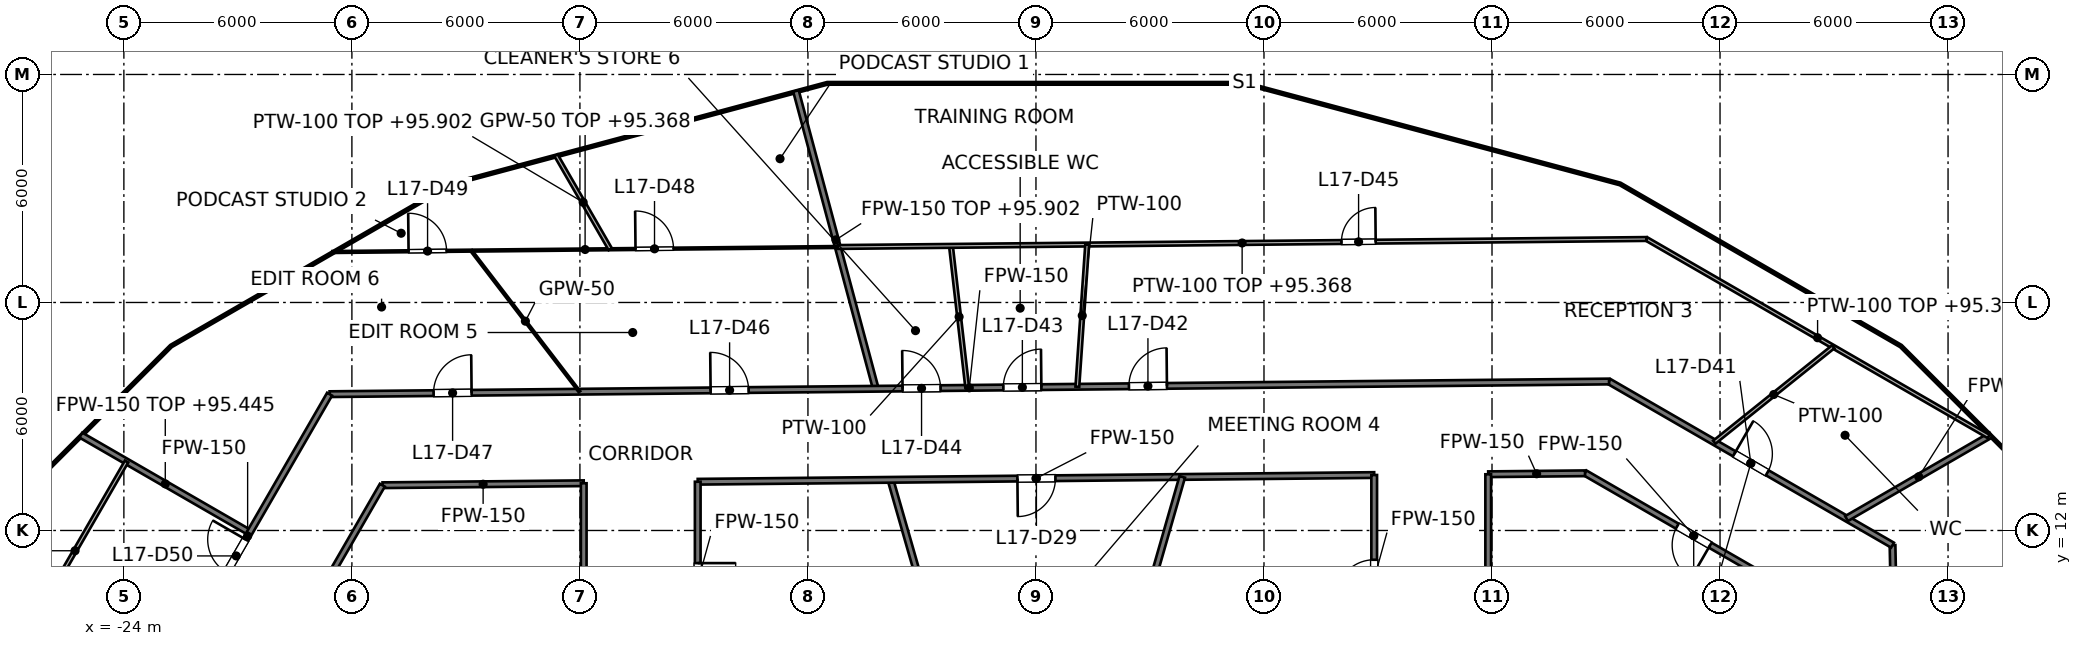
"""IFC4 building model, lengths in metres.
Left out: names, types, materials, properties, quantities, classifications, styles, units other than length and angle.
Written with IfcOpenShell. Run it as: python <this file> out.ifc"""

import sys

from ifc_helpers import new_model, si_unit, direction, frame, frame_2d, origin, place, context, subcontext, project, spatial, rectangle, extrude, element, fill, save


model = new_model("IFC4")
c1 = context("Model", 3, precision=1e-05, world=origin(), true_north=direction((0.0, 1.0)))
c2 = subcontext(c1, "Body", "Model", "MODEL_VIEW")
j1 = project(units=[si_unit("LENGTHUNIT", "METRE"), si_unit("PLANEANGLEUNIT", "RADIAN")], contexts=[c1])
p1 = place(None, origin())
s1 = spatial("IfcSite", under=j1, at=p1, CompositionType="ELEMENT")
p2 = place(p1, origin())
s2 = spatial("IfcBuilding", under=s1, at=p2, CompositionType="ELEMENT")
p3 = place(p2, frame((0.0, 0.0, 92.4)))
s3 = spatial("IfcBuildingStorey", under=s2, at=p3, CompositionType="ELEMENT", Elevation=92.4)
p4 = place(p3, frame((22.539, 11.615, 0.0), z_axis=(0.0, 0.0, 1.0), x_axis=(0.020601506683, -0.99978776644, 0.0)))
e1 = element("IfcWall", 1, at=p4, inside=s3, PredefinedType="PARTITIONING", context=c2, shape_type="SweptSolid", body=[
    extrude(rectangle(XDim=19.66, YDim=0.15, at=frame_2d((9.83, 0.0))), origin(), (0.0, 0.0, 1.0), 2.968),
])
p5 = place(p4, frame((13.54, 0.0, 0.0)))
e2 = element("IfcOpeningElement", 2, at=p5, cuts=e1, PredefinedType="OPENING", context=c2, shape_type="SweptSolid", body=[
    extrude(rectangle(XDim=1.0, YDim=2.1, at=frame_2d((0.5, 1.05))), frame((0.0, 0.075, 0.0), z_axis=(0.0, -1.0, 0.0), x_axis=(1.0, 0.0, 0.0)), (0.0, 0.0, 1.0), 0.15),
])
p6 = place(p4, frame((9.23, 0.0, 0.0)))
e3 = element("IfcOpeningElement", 3, at=p6, cuts=e1, PredefinedType="OPENING", context=c2, shape_type="SweptSolid", body=[
    extrude(rectangle(XDim=1.0, YDim=2.1, at=frame_2d((0.5, 1.05))), frame((0.0, 0.075, 0.0), z_axis=(0.0, -1.0, 0.0), x_axis=(1.0, 0.0, 0.0)), (0.0, 0.0, 1.0), 0.15),
])
p7 = place(p3, frame((-6.315, 23.566, 0.0), z_axis=(0.0, 0.0, 1.0), x_axis=(0.258844392232, -0.96591903419, 0.0)))
e4 = element("IfcWall", 4, at=p7, inside=s3, PredefinedType="PARTITIONING", context=c2, shape_type="SweptSolid", body=[
    extrude(rectangle(XDim=8.112, YDim=0.15, at=frame_2d((4.056, 0.0))), origin(), (0.0, 0.0, 1.0), 3.502),
])
p8 = place(p3, frame((-3.827, 13.333, 0.0), z_axis=(0.0, 0.0, 1.0), x_axis=(0.275935525478, -0.961176147113, 0.0)))
e5 = element("IfcWall", 5, at=p8, inside=s3, PredefinedType="PARTITIONING", context=c2, shape_type="SweptSolid", body=[
    extrude(rectangle(XDim=5.548, YDim=0.15, at=frame_2d((2.774, 0.0))), origin(), (0.0, 0.0, 1.0), 3.9),
])
p9 = place(p3, frame((-25.131, 14.509, 0.0), z_axis=(0.0, 0.0, 1.0), x_axis=(0.866037334331, -0.499979335118, 0.0)))
e6 = element("IfcWall", 6, at=p9, inside=s3, PredefinedType="PARTITIONING", context=c2, shape_type="SweptSolid", body=[
    extrude(rectangle(XDim=5.128, YDim=0.15, at=frame_2d((2.564, 0.0))), origin(), (0.0, 0.0, 1.0), 3.045),
])
p10 = place(p3, frame((14.448, 13.515, 0.0), z_axis=(0.0, 0.0, 1.0), x_axis=(0.866032288321, -0.499988075443, 0.0)))
e7 = element("IfcWall", 7, at=p10, inside=s3, PredefinedType="PARTITIONING", context=c2, shape_type="SweptSolid", body=[
    extrude(rectangle(XDim=6.604, YDim=0.15, at=frame_2d((3.302, 0.0))), origin(), (0.0, 0.0, 1.0), 2.968),
])
p11 = place(p10, frame((2.802, 0.0, 0.0)))
e8 = element("IfcOpeningElement", 8, at=p11, cuts=e7, PredefinedType="OPENING", context=c2, shape_type="SweptSolid", body=[
    extrude(rectangle(XDim=1.0, YDim=2.1, at=frame_2d((0.5, 1.05))), frame((0.0, 0.075, 0.0), z_axis=(0.0, -1.0, 0.0), x_axis=(1.0, 0.0, 0.0)), (0.0, 0.0, 1.0), 0.15),
])
p12 = place(p3, frame((15.08, 15.921, 0.0), z_axis=(0.0, 0.0, 1.0), x_axis=(0.866020838546, -0.500007907142, 0.0)))
e9 = element("IfcWall", 9, at=p12, inside=s3, PredefinedType="PARTITIONING", context=c2, shape_type="SweptSolid", body=[
    extrude(rectangle(XDim=8.613, YDim=0.15, at=frame_2d((4.306, 0.0))), origin(), (0.0, 0.0, 1.0), 2.968),
])
p13 = place(p12, frame((3.807, 0.0, 0.0)))
e10 = element("IfcOpeningElement", 10, at=p13, cuts=e9, PredefinedType="OPENING", context=c2, shape_type="SweptSolid", body=[
    extrude(rectangle(XDim=1.0, YDim=2.1, at=frame_2d((0.5, 1.05))), frame((0.0, 0.075, 0.0), z_axis=(0.0, -1.0, 0.0), x_axis=(1.0, 0.0, 0.0)), (0.0, 0.0, 1.0), 0.15),
])
p14 = place(p3, frame((-17.194, 13.191, 0.0), z_axis=(0.0, 0.0, 1.0), x_axis=(0.999950853109, 0.009914200296, 0.0)))
e11 = element("IfcWall", 11, at=p14, inside=s3, PredefinedType="PARTITIONING", context=c2, shape_type="SweptSolid", body=[
    extrude(rectangle(XDim=5.294, YDim=0.15, at=frame_2d((2.647, 0.0))), origin(), (0.0, 0.0, 1.0), 2.968),
])
p15 = place(p3, frame((-8.9, 13.282, 0.0), z_axis=(0.0, 0.0, 1.0), x_axis=(0.999950834077, 0.009916119672, 0.0)))
e12 = element("IfcWall", 12, at=p15, inside=s3, PredefinedType="PARTITIONING", context=c2, shape_type="SweptSolid", body=[
    extrude(rectangle(XDim=17.801, YDim=0.15, at=frame_2d((8.9, 0.0))), origin(), (0.0, 0.0, 1.0), 2.968),
])
p16 = place(p15, frame((8.412, 0.0, 0.0)))
e13 = element("IfcOpeningElement", 13, at=p16, cuts=e12, PredefinedType="OPENING", context=c2, shape_type="SweptSolid", body=[
    extrude(rectangle(XDim=1.0, YDim=2.1, at=frame_2d((0.5, 1.05))), frame((0.0, 0.075, 0.0), z_axis=(0.0, -1.0, 0.0), x_axis=(1.0, 0.0, 0.0)), (0.0, 0.0, 1.0), 0.15),
])
p17 = place(p3, frame((11.9, 13.48, 0.0), z_axis=(0.0, 0.0, 1.0), x_axis=(0.999950357576, 0.009964054536, 0.0)))
e14 = element("IfcWall", 14, at=p17, inside=s3, PredefinedType="PARTITIONING", context=c2, shape_type="SweptSolid", body=[
    extrude(rectangle(XDim=2.548, YDim=0.15, at=frame_2d((1.274, 0.0))), origin(), (0.0, 0.0, 1.0), 2.968),
])
p18 = place(p3, frame((-18.587, 15.587, 0.0), z_axis=(0.0, 0.0, 1.0), x_axis=(0.99995087003, 0.009912493396, 0.0)))
e15 = element("IfcWall", 15, at=p18, inside=s3, PredefinedType="PARTITIONING", context=c2, shape_type="SweptSolid", body=[
    extrude(rectangle(XDim=33.669, YDim=0.15, at=frame_2d((16.834, 0.0))), origin(), (0.0, 0.0, 1.0), 2.968),
])
p19 = place(p18, frame((21.034, 0.0, 0.0)))
e16 = element("IfcOpeningElement", 16, at=p19, cuts=e15, PredefinedType="OPENING", context=c2, shape_type="SweptSolid", body=[
    extrude(rectangle(XDim=1.0, YDim=2.1, at=frame_2d((0.5, 1.05))), frame((0.0, 0.075, 0.0), z_axis=(0.0, -1.0, 0.0), x_axis=(1.0, 0.0, 0.0)), (0.0, 0.0, 1.0), 0.15),
])
p20 = place(p18, frame((17.73, 0.0, 0.0)))
e17 = element("IfcOpeningElement", 17, at=p20, cuts=e15, PredefinedType="OPENING", context=c2, shape_type="SweptSolid", body=[
    extrude(rectangle(XDim=1.0, YDim=2.1, at=frame_2d((0.5, 1.05))), frame((0.0, 0.075, 0.0), z_axis=(0.0, -1.0, 0.0), x_axis=(1.0, 0.0, 0.0)), (0.0, 0.0, 1.0), 0.15),
])
p21 = place(p18, frame((15.077, 0.0, 0.0)))
e18 = element("IfcOpeningElement", 18, at=p21, cuts=e15, PredefinedType="OPENING", context=c2, shape_type="SweptSolid", body=[
    extrude(rectangle(XDim=1.0, YDim=2.1, at=frame_2d((0.5, 1.05))), frame((0.0, 0.075, 0.0), z_axis=(0.0, -1.0, 0.0), x_axis=(1.0, 0.0, 0.0)), (0.0, 0.0, 1.0), 0.15),
])
p22 = place(p18, frame((10.026, 0.0, 0.0)))
e19 = element("IfcOpeningElement", 19, at=p22, cuts=e15, PredefinedType="OPENING", context=c2, shape_type="SweptSolid", body=[
    extrude(rectangle(XDim=1.0, YDim=2.1, at=frame_2d((0.5, 1.05))), frame((0.0, 0.075, 0.0), z_axis=(0.0, -1.0, 0.0), x_axis=(1.0, 0.0, 0.0)), (0.0, 0.0, 1.0), 0.15),
])
p23 = place(p18, frame((2.737, 0.0, 0.0)))
e20 = element("IfcOpeningElement", 20, at=p23, cuts=e15, PredefinedType="OPENING", context=c2, shape_type="SweptSolid", body=[
    extrude(rectangle(XDim=1.0, YDim=2.1, at=frame_2d((0.5, 1.05))), frame((0.0, 0.075, 0.0), z_axis=(0.0, -1.0, 0.0), x_axis=(1.0, 0.0, 0.0)), (0.0, 0.0, 1.0), 0.15),
])
p24 = place(p3, frame((21.329, 12.314, 0.0), z_axis=(0.0, 0.0, 1.0), x_axis=(0.865416132284, 0.501053807472, 0.0)))
e21 = element("IfcWall", 21, at=p24, inside=s3, PredefinedType="PARTITIONING", context=c2, shape_type="SweptSolid", body=[
    extrude(rectangle(XDim=4.39, YDim=0.15, at=frame_2d((2.195, 0.0))), origin(), (0.0, 0.0, 1.0), 3.045),
])
p25 = place(p3, frame((-20.5, 7.474, 0.0), z_axis=(0.0, 0.0, 1.0), x_axis=(0.500012665616, 0.866018091164, 0.0)))
e22 = element("IfcWall", 22, at=p25, inside=s3, PredefinedType="PARTITIONING", context=c2, shape_type="SweptSolid", body=[
    extrude(rectangle(XDim=6.602, YDim=0.15, at=frame_2d((3.301, 0.0))), origin(), (0.0, 0.0, 1.0), 2.968),
])
p26 = place(p25, frame((2.803, 0.0, 0.0)))
e23 = element("IfcOpeningElement", 23, at=p26, cuts=e22, PredefinedType="OPENING", context=c2, shape_type="SweptSolid", body=[
    extrude(rectangle(XDim=1.0, YDim=2.1, at=frame_2d((0.5, 1.05))), frame((0.0, 0.075, 0.0), z_axis=(0.0, -1.0, 0.0), x_axis=(1.0, 0.0, 0.0)), (0.0, 0.0, 1.0), 0.15),
])
p27 = place(p3, frame((-22.9, 8.117, 0.0), z_axis=(0.0, 0.0, 1.0), x_axis=(0.5000050195, 0.866022505755, 0.0)))
e24 = element("IfcWall", 24, at=p27, inside=s3, PredefinedType="PARTITIONING", context=c2, shape_type="SweptSolid", body=[
    extrude(rectangle(XDim=8.626, YDim=0.15, at=frame_2d((4.313, 0.0))), origin(), (0.0, 0.0, 1.0), 2.968),
])
p28 = place(p27, frame((3.211, 0.0, 0.0)))
e25 = element("IfcOpeningElement", 25, at=p28, cuts=e24, PredefinedType="OPENING", context=c2, shape_type="SweptSolid", body=[
    extrude(rectangle(XDim=1.0, YDim=2.1, at=frame_2d((0.5, 1.05))), frame((0.0, 0.075, 0.0), z_axis=(0.0, -1.0, 0.0), x_axis=(1.0, 0.0, 0.0)), (0.0, 0.0, 1.0), 0.15),
])
p29 = place(p3, frame((2.296, 8.0, 0.0), z_axis=(0.0, 0.0, 1.0), x_axis=(0.275958345059, 0.961169595749, 0.0)))
e26 = element("IfcWall", 26, at=p29, inside=s3, PredefinedType="PARTITIONING", context=c2, shape_type="SweptSolid", body=[
    extrude(rectangle(XDim=5.628, YDim=0.15, at=frame_2d((2.814, 0.0))), origin(), (0.0, 0.0, 1.0), 3.9),
])
p30 = place(p3, frame((11.9, 8.0, 0.0), z_axis=(0.0, 0.0, 1.0), x_axis=(0.0, 1.0, 0.0)))
e27 = element("IfcWall", 27, at=p30, inside=s3, PredefinedType="PARTITIONING", context=c2, shape_type="SweptSolid", body=[
    extrude(rectangle(XDim=5.479, YDim=0.15, at=frame_2d((2.74, 0.0))), origin(), (0.0, 0.0, 1.0), 2.968),
])
p31 = place(p3, frame((8.9, 8.0, 0.0), z_axis=(0.0, 0.0, 1.0), x_axis=(0.0, 1.0, 0.0)))
e28 = element("IfcWall", 28, at=p31, inside=s3, PredefinedType="PARTITIONING", context=c2, shape_type="SweptSolid", body=[
    extrude(rectangle(XDim=5.46, YDim=0.15, at=frame_2d((2.73, 0.0))), origin(), (0.0, 0.0, 1.0), 2.968),
])
p32 = place(p31, frame((2.23, 0.0, 0.0)))
e29 = element("IfcOpeningElement", 29, at=p32, cuts=e28, PredefinedType="OPENING", context=c2, shape_type="SweptSolid", body=[
    extrude(rectangle(XDim=1.0, YDim=2.1, at=frame_2d((0.5, 1.05))), frame((0.0, 0.075, 0.0), z_axis=(0.0, -1.0, 0.0), x_axis=(1.0, 0.0, 0.0)), (0.0, 0.0, 1.0), 0.15),
])
p33 = place(p3, frame((-8.9, 8.0, 0.0), z_axis=(0.0, 0.0, 1.0), x_axis=(0.0, 1.0, 0.0)))
e30 = element("IfcWall", 30, at=p33, inside=s3, PredefinedType="PARTITIONING", context=c2, shape_type="SweptSolid", body=[
    extrude(rectangle(XDim=5.283, YDim=0.15, at=frame_2d((2.642, 0.0))), origin(), (0.0, 0.0, 1.0), 2.968),
])
p34 = place(p33, frame((2.142, 0.0, 0.0)))
e31 = element("IfcOpeningElement", 31, at=p34, cuts=e30, PredefinedType="OPENING", context=c2, shape_type="SweptSolid", body=[
    extrude(rectangle(XDim=1.0, YDim=2.1, at=frame_2d((0.5, 1.05))), frame((0.0, 0.075, 0.0), z_axis=(0.0, -1.0, 0.0), x_axis=(1.0, 0.0, 0.0)), (0.0, 0.0, 1.0), 0.15),
])
p35 = place(p3, frame((-11.9, 8.0, 0.0), z_axis=(0.0, 0.0, 1.0), x_axis=(0.0, 1.0, 0.0)))
e32 = element("IfcWall", 32, at=p35, inside=s3, PredefinedType="PARTITIONING", context=c2, shape_type="SweptSolid", body=[
    extrude(rectangle(XDim=5.243, YDim=0.15, at=frame_2d((2.622, 0.0))), origin(), (0.0, 0.0, 1.0), 2.968),
])
p36 = place(p3, frame((-14.859, 19.364, 0.0), z_axis=(0.0, 0.0, 1.0), x_axis=(0.608714147517, -0.793389618418, 0.0)))
e33 = element("IfcWall", 33, at=p36, inside=s3, PredefinedType="PARTITIONING", context=c2, shape_type="SweptSolid", body=[
    extrude(rectangle(XDim=4.678, YDim=0.05, at=frame_2d((2.339, 0.0))), origin(), (0.0, 0.0, 1.0), 3.9),
])
p37 = place(p3, frame((-18.512, 19.328, 0.0), z_axis=(0.0, 0.0, 1.0), x_axis=(0.999950851933, 0.009914318817, 0.0)))
e34 = element("IfcWall", 34, at=p37, inside=s3, PredefinedType="PARTITIONING", context=c2, shape_type="SweptSolid", body=[
    extrude(rectangle(XDim=13.298, YDim=0.05, at=frame_2d((6.649, 0.0))), origin(), (0.0, 0.0, 1.0), 2.968),
])
p38 = place(p37, frame((7.975, 0.0, 0.0)))
e35 = element("IfcOpeningElement", 35, at=p38, cuts=e34, PredefinedType="OPENING", context=c2, shape_type="SweptSolid", body=[
    extrude(rectangle(XDim=1.0, YDim=2.1, at=frame_2d((0.5, 1.05))), frame((0.0, 0.025, 0.0), z_axis=(0.0, -1.0, 0.0), x_axis=(1.0, 0.0, 0.0)), (0.0, 0.0, 1.0), 0.05),
])
p39 = place(p37, frame((2.003, 0.0, 0.0)))
e36 = element("IfcOpeningElement", 36, at=p39, cuts=e34, PredefinedType="OPENING", context=c2, shape_type="SweptSolid", body=[
    extrude(rectangle(XDim=1.0, YDim=2.1, at=frame_2d((0.5, 1.05))), frame((0.0, 0.025, 0.0), z_axis=(0.0, -1.0, 0.0), x_axis=(1.0, 0.0, 0.0)), (0.0, 0.0, 1.0), 0.05),
])
p40 = place(p3, frame((-2.237, 19.49, 0.0), z_axis=(0.0, 0.0, 1.0), x_axis=(0.114064733863, -0.993473319465, 0.0)))
e37 = element("IfcWall", 37, at=p40, inside=s3, PredefinedType="PARTITIONING", context=c2, shape_type="SweptSolid", body=[
    extrude(rectangle(XDim=3.761, YDim=0.1, at=frame_2d((1.88, 0.0))), origin(), (0.0, 0.0, 1.0), 3.9),
])
p41 = place(p3, frame((-12.629, 21.874, 0.0), z_axis=(0.0, 0.0, 1.0), x_axis=(0.500028324968, -0.866009049739, 0.0)))
e38 = element("IfcWall", 38, at=p41, inside=s3, PredefinedType="PARTITIONING", context=c2, shape_type="SweptSolid", body=[
    extrude(rectangle(XDim=2.856, YDim=0.1, at=frame_2d((1.428, 0.0))), origin(), (0.0, 0.0, 1.0), 3.502),
])
p42 = place(p3, frame((16.065, 19.671, 0.0), z_axis=(0.0, 0.0, 1.0), x_axis=(0.866058502288, -0.499942667328, 0.0)))
e39 = element("IfcWall", 39, at=p42, inside=s3, PredefinedType="PARTITIONING", context=c2, shape_type="SweptSolid", body=[
    extrude(rectangle(XDim=10.397, YDim=0.1, at=frame_2d((5.198, 0.0))), origin(), (0.0, 0.0, 1.0), 2.968),
])
p43 = place(p3, frame((-5.215, 19.46, 0.0), z_axis=(0.0, 0.0, 1.0), x_axis=(0.999950988801, 0.00990050484, 0.0)))
e40 = element("IfcWall", 40, at=p43, inside=s3, PredefinedType="PARTITIONING", context=c2, shape_type="SweptSolid", body=[
    extrude(rectangle(XDim=21.281, YDim=0.1, at=frame_2d((10.641, 0.0))), origin(), (0.0, 0.0, 1.0), 2.968),
])
p44 = place(p43, frame((13.255, 0.0, 0.0)))
e41 = element("IfcOpeningElement", 41, at=p44, cuts=e40, PredefinedType="OPENING", context=c2, shape_type="SweptSolid", body=[
    extrude(rectangle(XDim=0.9, YDim=2.1, at=frame_2d((0.45, 1.05))), frame((0.0, 0.05, 0.0), z_axis=(0.0, -1.0, 0.0), x_axis=(1.0, 0.0, 0.0)), (0.0, 0.0, 1.0), 0.1),
])
p45 = place(p3, frame((17.849, 14.323, 0.0), z_axis=(0.0, 0.0, 1.0), x_axis=(0.7800073623, 0.625770337071, 0.0)))
e42 = element("IfcWall", 42, at=p45, inside=s3, PredefinedType="PARTITIONING", context=c2, shape_type="SweptSolid", body=[
    extrude(rectangle(XDim=4.013, YDim=0.1, at=frame_2d((2.006, 0.0))), origin(), (0.0, 0.0, 1.0), 3.9),
])
p46 = place(p3, frame((-26.64, 9.119, 0.0), z_axis=(0.0, 0.0, 1.0), x_axis=(0.499955005135, 0.866051380023, 0.0)))
e43 = element("IfcWall", 43, at=p46, inside=s3, PredefinedType="PARTITIONING", context=c2, shape_type="SweptSolid", body=[
    extrude(rectangle(XDim=5.422, YDim=0.1, at=frame_2d((2.711, 0.0))), origin(), (0.0, 0.0, 1.0), 2.977),
])
p47 = place(p3, frame((1.089, 15.783, 0.0), z_axis=(0.0, 0.0, 1.0), x_axis=(0.068735075686, 0.99763494795, 0.0)))
e44 = element("IfcWall", 44, at=p47, inside=s3, PredefinedType="PARTITIONING", context=c2, shape_type="SweptSolid", body=[
    extrude(rectangle(XDim=3.751, YDim=0.1, at=frame_2d((1.875, 0.0))), origin(), (0.0, 0.0, 1.0), 3.9),
])
p48 = place(p11, origin())
e45 = element("IfcDoor", 45, at=p48, inside=s3, OperationType="SINGLE_SWING_RIGHT", PredefinedType="DOOR", context=c2, shape_type="SweptSolid", body=[
    extrude(rectangle(XDim=1.0, YDim=2.1, at=frame_2d((0.5, 1.05))), frame((0.0, 0.025, 0.0), z_axis=(0.0, -1.0, 0.0), x_axis=(1.0, 0.0, 0.0)), (0.0, 0.0, 1.0), 0.05),
])
fill(e8, e45)
p49 = place(p32, origin())
e46 = element("IfcDoor", 46, at=p49, inside=s3, OperationType="SINGLE_SWING_LEFT", PredefinedType="DOOR", context=c2, shape_type="SweptSolid", body=[
    extrude(rectangle(XDim=1.0, YDim=2.1, at=frame_2d((0.5, 1.05))), frame((0.0, 0.025, 0.0), z_axis=(0.0, -1.0, 0.0), x_axis=(1.0, 0.0, 0.0)), (0.0, 0.0, 1.0), 0.05),
])
fill(e29, e46)
p50 = place(p16, origin())
e47 = element("IfcDoor", 47, at=p50, inside=s3, OperationType="SINGLE_SWING_LEFT", PredefinedType="DOOR", context=c2, shape_type="SweptSolid", body=[
    extrude(rectangle(XDim=1.0, YDim=2.1, at=frame_2d((0.5, 1.05))), frame((0.0, 0.025, 0.0), z_axis=(0.0, -1.0, 0.0), x_axis=(1.0, 0.0, 0.0)), (0.0, 0.0, 1.0), 0.05),
])
fill(e13, e47)
p51 = place(p34, origin())
e48 = element("IfcDoor", 48, at=p51, inside=s3, OperationType="SINGLE_SWING_RIGHT", PredefinedType="DOOR", context=c2, shape_type="SweptSolid", body=[
    extrude(rectangle(XDim=1.0, YDim=2.1, at=frame_2d((0.5, 1.05))), frame((0.0, 0.025, 0.0), z_axis=(0.0, -1.0, 0.0), x_axis=(1.0, 0.0, 0.0)), (0.0, 0.0, 1.0), 0.05),
])
fill(e31, e48)
p52 = place(p13, origin())
e49 = element("IfcDoor", 49, at=p52, inside=s3, OperationType="SINGLE_SWING_LEFT", PredefinedType="DOOR", context=c2, shape_type="SweptSolid", body=[
    extrude(rectangle(XDim=1.0, YDim=2.1, at=frame_2d((0.5, 1.05))), frame((0.0, 0.025, 0.0), z_axis=(0.0, -1.0, 0.0), x_axis=(1.0, 0.0, 0.0)), (0.0, 0.0, 1.0), 0.05),
])
fill(e10, e49)
p53 = place(p19, origin())
e50 = element("IfcDoor", 50, at=p53, inside=s3, OperationType="SINGLE_SWING_RIGHT", PredefinedType="DOOR", context=c2, shape_type="SweptSolid", body=[
    extrude(rectangle(XDim=1.0, YDim=2.1, at=frame_2d((0.5, 1.05))), frame((0.0, 0.025, 0.0), z_axis=(0.0, -1.0, 0.0), x_axis=(1.0, 0.0, 0.0)), (0.0, 0.0, 1.0), 0.05),
])
fill(e16, e50)
p54 = place(p20, origin())
e51 = element("IfcDoor", 51, at=p54, inside=s3, OperationType="SINGLE_SWING_RIGHT", PredefinedType="DOOR", context=c2, shape_type="SweptSolid", body=[
    extrude(rectangle(XDim=1.0, YDim=2.1, at=frame_2d((0.5, 1.05))), frame((0.0, 0.025, 0.0), z_axis=(0.0, -1.0, 0.0), x_axis=(1.0, 0.0, 0.0)), (0.0, 0.0, 1.0), 0.05),
])
fill(e17, e51)
p55 = place(p21, origin())
e52 = element("IfcDoor", 52, at=p55, inside=s3, OperationType="SINGLE_SWING_LEFT", PredefinedType="DOOR", context=c2, shape_type="SweptSolid", body=[
    extrude(rectangle(XDim=1.0, YDim=2.1, at=frame_2d((0.5, 1.05))), frame((0.0, 0.025, 0.0), z_axis=(0.0, -1.0, 0.0), x_axis=(1.0, 0.0, 0.0)), (0.0, 0.0, 1.0), 0.05),
])
fill(e18, e52)
p56 = place(p44, origin())
e53 = element("IfcDoor", 53, at=p56, inside=s3, OperationType="SINGLE_SWING_RIGHT", PredefinedType="DOOR", context=c2, shape_type="SweptSolid", body=[
    extrude(rectangle(XDim=0.9, YDim=2.1, at=frame_2d((0.45, 1.05))), frame((0.0, 0.025, 0.0), z_axis=(0.0, -1.0, 0.0), x_axis=(1.0, 0.0, 0.0)), (0.0, 0.0, 1.0), 0.05),
])
fill(e41, e53)
p57 = place(p22, origin())
e54 = element("IfcDoor", 54, at=p57, inside=s3, OperationType="SINGLE_SWING_LEFT", PredefinedType="DOOR", context=c2, shape_type="SweptSolid", body=[
    extrude(rectangle(XDim=1.0, YDim=2.1, at=frame_2d((0.5, 1.05))), frame((0.0, 0.025, 0.0), z_axis=(0.0, -1.0, 0.0), x_axis=(1.0, 0.0, 0.0)), (0.0, 0.0, 1.0), 0.05),
])
fill(e19, e54)
p58 = place(p23, origin())
e55 = element("IfcDoor", 55, at=p58, inside=s3, OperationType="SINGLE_SWING_RIGHT", PredefinedType="DOOR", context=c2, shape_type="SweptSolid", body=[
    extrude(rectangle(XDim=1.0, YDim=2.1, at=frame_2d((0.5, 1.05))), frame((0.0, 0.025, 0.0), z_axis=(0.0, -1.0, 0.0), x_axis=(1.0, 0.0, 0.0)), (0.0, 0.0, 1.0), 0.05),
])
fill(e20, e55)
p59 = place(p38, origin())
e56 = element("IfcDoor", 56, at=p59, inside=s3, OperationType="SINGLE_SWING_LEFT", PredefinedType="DOOR", context=c2, shape_type="SweptSolid", body=[
    extrude(rectangle(XDim=1.0, YDim=2.1, at=frame_2d((0.5, 1.05))), frame((0.0, 0.025, 0.0), z_axis=(0.0, -1.0, 0.0), x_axis=(1.0, 0.0, 0.0)), (0.0, 0.0, 1.0), 0.05),
])
fill(e35, e56)
p60 = place(p39, origin())
e57 = element("IfcDoor", 57, at=p60, inside=s3, OperationType="SINGLE_SWING_LEFT", PredefinedType="DOOR", context=c2, shape_type="SweptSolid", body=[
    extrude(rectangle(XDim=1.0, YDim=2.1, at=frame_2d((0.5, 1.05))), frame((0.0, 0.025, 0.0), z_axis=(0.0, -1.0, 0.0), x_axis=(1.0, 0.0, 0.0)), (0.0, 0.0, 1.0), 0.05),
])
fill(e36, e57)
p61 = place(p28, origin())
e58 = element("IfcDoor", 58, at=p61, inside=s3, OperationType="SINGLE_SWING_RIGHT", PredefinedType="DOOR", context=c2, shape_type="SweptSolid", body=[
    extrude(rectangle(XDim=1.0, YDim=2.1, at=frame_2d((0.5, 1.05))), frame((0.0, 0.025, 0.0), z_axis=(0.0, -1.0, 0.0), x_axis=(1.0, 0.0, 0.0)), (0.0, 0.0, 1.0), 0.05),
])
fill(e25, e58)
save(model, sys.argv[1])
